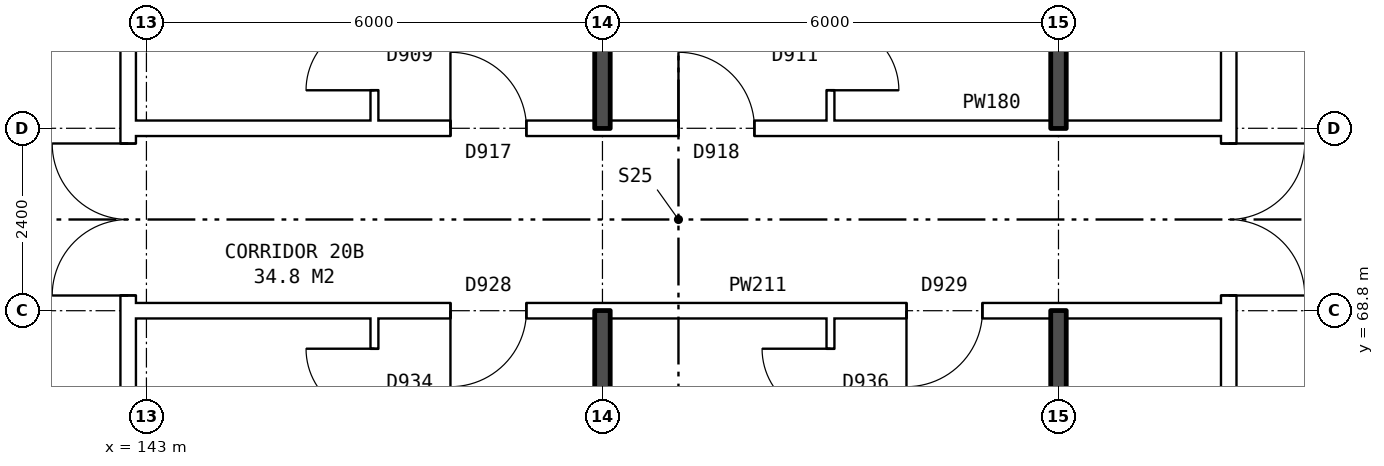
"""IFC4 building model, lengths in metres.
Left out: names, types, materials, properties, quantities, classifications, styles, units other than length and angle.
Written with IfcOpenShell. Run it as: python <this file> out.ifc"""

import sys

from ifc_helpers import new_model, si_unit, direction, frame, frame_2d, origin, place, context, subcontext, project, spatial, rectangle, extrude, element, fill, save


model = new_model("IFC4")
c1 = context("Model", 3, precision=1e-05, world=origin(), true_north=direction((0.0, 1.0)))
c2 = subcontext(c1, "Body", "Model", "MODEL_VIEW")
j1 = project(units=[si_unit("LENGTHUNIT", "METRE"), si_unit("PLANEANGLEUNIT", "RADIAN")], contexts=[c1])
p1 = place(None, origin())
s1 = spatial("IfcSite", under=j1, at=p1, CompositionType="ELEMENT")
p2 = place(p1, origin())
s2 = spatial("IfcBuilding", under=s1, at=p2, CompositionType="ELEMENT")
p3 = place(p2, frame((0.0, 0.0, 74.7)))
s3 = spatial("IfcBuildingStorey", under=s2, at=p3, CompositionType="ELEMENT", Elevation=74.7)
p4 = place(p3, frame((142.76, 63.9, 0.0), z_axis=(0.0, 0.0, 1.0), x_axis=(0.0, 1.0, 0.0)))
e1 = element("IfcWall", 1, at=p4, inside=s3, PredefinedType="PARTITIONING", context=c2, shape_type="SweptSolid", body=[
    extrude(rectangle(XDim=12.2, YDim=0.2, at=frame_2d((6.1, 0.0))), origin(), (0.0, 0.0, 1.0), 2.85),
])
p5 = place(p4, frame((5.1, 0.0, 0.0)))
e2 = element("IfcOpeningElement", 2, at=p5, cuts=e1, PredefinedType="OPENING", context=c2, shape_type="SweptSolid", body=[
    extrude(rectangle(XDim=2.0, YDim=2.1, at=frame_2d((1.0, 1.05))), frame((0.0, 0.11, 0.0), z_axis=(0.0, -1.0, 0.0), x_axis=(1.0, 0.0, 0.0)), (0.0, 0.0, 1.0), 0.22),
])
p6 = place(p3, frame((157.24, 63.9, 0.0), z_axis=(0.0, 0.0, 1.0), x_axis=(0.0, 1.0, 0.0)))
e3 = element("IfcWall", 3, at=p6, inside=s3, PredefinedType="PARTITIONING", context=c2, shape_type="SweptSolid", body=[
    extrude(rectangle(XDim=12.2, YDim=0.2, at=frame_2d((6.1, 0.0))), origin(), (0.0, 0.0, 1.0), 2.85),
])
p7 = place(p6, frame((5.1, 0.0, 0.0)))
e4 = element("IfcOpeningElement", 4, at=p7, cuts=e3, PredefinedType="OPENING", context=c2, shape_type="SweptSolid", body=[
    extrude(rectangle(XDim=2.0, YDim=2.1, at=frame_2d((1.0, 1.05))), frame((0.0, 0.11, 0.0), z_axis=(0.0, -1.0, 0.0), x_axis=(1.0, 0.0, 0.0)), (0.0, 0.0, 1.0), 0.22),
])
p8 = place(p3, frame((142.76, 68.8, 0.0), z_axis=(0.0, 0.0, 1.0), x_axis=(1.0, 0.0, 0.0)))
e5 = element("IfcWall", 5, at=p8, inside=s3, PredefinedType="PARTITIONING", context=c2, shape_type="SweptSolid", body=[
    extrude(rectangle(XDim=14.48, YDim=0.2, at=frame_2d((7.24, 0.0))), origin(), (0.0, 0.0, 1.0), 2.85),
])
p9 = place(p8, frame((4.24, 0.0, 0.0)))
e6 = element("IfcOpeningElement", 6, at=p9, cuts=e5, PredefinedType="OPENING", context=c2, shape_type="SweptSolid", body=[
    extrude(rectangle(XDim=1.0, YDim=2.1, at=frame_2d((0.5, 1.05))), frame((0.0, 0.11, 0.0), z_axis=(0.0, -1.0, 0.0), x_axis=(1.0, 0.0, 0.0)), (0.0, 0.0, 1.0), 0.22),
])
p10 = place(p8, frame((10.24, 0.0, 0.0)))
e7 = element("IfcOpeningElement", 7, at=p10, cuts=e5, PredefinedType="OPENING", context=c2, shape_type="SweptSolid", body=[
    extrude(rectangle(XDim=1.0, YDim=2.1, at=frame_2d((0.5, 1.05))), frame((0.0, 0.11, 0.0), z_axis=(0.0, -1.0, 0.0), x_axis=(1.0, 0.0, 0.0)), (0.0, 0.0, 1.0), 0.22),
])
p11 = place(p3, frame((142.76, 71.2, 0.0), z_axis=(0.0, 0.0, 1.0), x_axis=(1.0, 0.0, 0.0)))
e8 = element("IfcWall", 8, at=p11, inside=s3, PredefinedType="PARTITIONING", context=c2, shape_type="SweptSolid", body=[
    extrude(rectangle(XDim=14.48, YDim=0.2, at=frame_2d((7.24, 0.0))), origin(), (0.0, 0.0, 1.0), 2.85),
])
p12 = place(p11, frame((4.24, 0.0, 0.0)))
e9 = element("IfcOpeningElement", 9, at=p12, cuts=e8, PredefinedType="OPENING", context=c2, shape_type="SweptSolid", body=[
    extrude(rectangle(XDim=1.0, YDim=2.1, at=frame_2d((0.5, 1.05))), frame((0.0, 0.11, 0.0), z_axis=(0.0, -1.0, 0.0), x_axis=(1.0, 0.0, 0.0)), (0.0, 0.0, 1.0), 0.22),
])
p13 = place(p11, frame((7.24, 0.0, 0.0)))
e10 = element("IfcOpeningElement", 10, at=p13, cuts=e8, PredefinedType="OPENING", context=c2, shape_type="SweptSolid", body=[
    extrude(rectangle(XDim=1.0, YDim=2.1, at=frame_2d((0.5, 1.05))), frame((0.0, 0.11, 0.0), z_axis=(0.0, -1.0, 0.0), x_axis=(1.0, 0.0, 0.0)), (0.0, 0.0, 1.0), 0.22),
])
p14 = place(p3, frame((146.0, 54.36, 0.0), z_axis=(0.0, 0.0, 1.0), x_axis=(0.0, 1.0, 0.0)))
e11 = element("IfcWall", 11, at=p14, inside=s3, PredefinedType="PARTITIONING", context=c2, shape_type="SweptSolid", body=[
    extrude(rectangle(XDim=14.34, YDim=0.1, at=frame_2d((7.17, 0.0))), origin(), (0.0, 0.0, 1.0), 2.85),
])
p15 = place(p14, frame((4.2, 0.0, 0.0)))
e12 = element("IfcOpeningElement", 12, at=p15, cuts=e11, PredefinedType="OPENING", context=c2, shape_type="SweptSolid", body=[
    extrude(rectangle(XDim=0.9, YDim=2.1, at=frame_2d((0.45, 1.05))), frame((0.0, 0.06, 0.0), z_axis=(0.0, -1.0, 0.0), x_axis=(1.0, 0.0, 0.0)), (0.0, 0.0, 1.0), 0.12),
])
p16 = place(p14, frame((13.04, 0.0, 0.0)))
e13 = element("IfcOpeningElement", 13, at=p16, cuts=e11, PredefinedType="OPENING", context=c2, shape_type="SweptSolid", body=[
    extrude(rectangle(XDim=0.9, YDim=2.1, at=frame_2d((0.45, 1.05))), frame((0.0, 0.06, 0.0), z_axis=(0.0, -1.0, 0.0), x_axis=(1.0, 0.0, 0.0)), (0.0, 0.0, 1.0), 0.12),
])
p17 = place(p3, frame((146.0, 71.3, 0.0), z_axis=(0.0, 0.0, 1.0), x_axis=(0.0, 1.0, 0.0)))
e14 = element("IfcWall", 14, at=p17, inside=s3, PredefinedType="PARTITIONING", context=c2, shape_type="SweptSolid", body=[
    extrude(rectangle(XDim=14.34, YDim=0.1, at=frame_2d((7.17, 0.0))), origin(), (0.0, 0.0, 1.0), 2.85),
])
p18 = place(p17, frame((9.24, 0.0, 0.0)))
e15 = element("IfcOpeningElement", 15, at=p18, cuts=e14, PredefinedType="OPENING", context=c2, shape_type="SweptSolid", body=[
    extrude(rectangle(XDim=0.9, YDim=2.1, at=frame_2d((0.45, 1.05))), frame((0.0, 0.06, 0.0), z_axis=(0.0, -1.0, 0.0), x_axis=(1.0, 0.0, 0.0)), (0.0, 0.0, 1.0), 0.12),
])
p19 = place(p17, frame((0.4, 0.0, 0.0)))
e16 = element("IfcOpeningElement", 16, at=p19, cuts=e14, PredefinedType="OPENING", context=c2, shape_type="SweptSolid", body=[
    extrude(rectangle(XDim=0.9, YDim=2.1, at=frame_2d((0.45, 1.05))), frame((0.0, 0.06, 0.0), z_axis=(0.0, -1.0, 0.0), x_axis=(1.0, 0.0, 0.0)), (0.0, 0.0, 1.0), 0.12),
])
for number, where, z_axis, x_axis in (
    (17, (149.0, 54.36, 0.0), (0.0, 0.0, 1.0), (0.0, 1.0, 0.0)),
    (18, (149.0, 71.2, 0.0), (0.0, 0.0, 1.0), (0.0, 1.0, 0.0)),
):
    element("IfcWall", number, at=place(p3, frame(where, z_axis=z_axis, x_axis=x_axis)), inside=s3, PredefinedType="SOLIDWALL", context=c2, shape_type="SweptSolid", body=[
        extrude(rectangle(XDim=14.44, YDim=0.2, at=frame_2d((7.22, 0.0))), origin(), (0.0, 0.0, 1.0), 2.85),
    ])
p20 = place(p3, frame((152.0, 54.36, 0.0), z_axis=(0.0, 0.0, 1.0), x_axis=(0.0, 1.0, 0.0)))
e19 = element("IfcWall", 19, at=p20, inside=s3, PredefinedType="PARTITIONING", context=c2, shape_type="SweptSolid", body=[
    extrude(rectangle(XDim=14.34, YDim=0.1, at=frame_2d((7.17, 0.0))), origin(), (0.0, 0.0, 1.0), 2.85),
])
p21 = place(p20, frame((4.2, 0.0, 0.0)))
e20 = element("IfcOpeningElement", 20, at=p21, cuts=e19, PredefinedType="OPENING", context=c2, shape_type="SweptSolid", body=[
    extrude(rectangle(XDim=0.9, YDim=2.1, at=frame_2d((0.45, 1.05))), frame((0.0, 0.06, 0.0), z_axis=(0.0, -1.0, 0.0), x_axis=(1.0, 0.0, 0.0)), (0.0, 0.0, 1.0), 0.12),
])
p22 = place(p20, frame((13.04, 0.0, 0.0)))
e21 = element("IfcOpeningElement", 21, at=p22, cuts=e19, PredefinedType="OPENING", context=c2, shape_type="SweptSolid", body=[
    extrude(rectangle(XDim=0.9, YDim=2.1, at=frame_2d((0.45, 1.05))), frame((0.0, 0.06, 0.0), z_axis=(0.0, -1.0, 0.0), x_axis=(1.0, 0.0, 0.0)), (0.0, 0.0, 1.0), 0.12),
])
p23 = place(p3, frame((152.0, 71.3, 0.0), z_axis=(0.0, 0.0, 1.0), x_axis=(0.0, 1.0, 0.0)))
e22 = element("IfcWall", 22, at=p23, inside=s3, PredefinedType="PARTITIONING", context=c2, shape_type="SweptSolid", body=[
    extrude(rectangle(XDim=14.34, YDim=0.1, at=frame_2d((7.17, 0.0))), origin(), (0.0, 0.0, 1.0), 2.85),
])
p24 = place(p23, frame((7.94, 0.0, 0.0)))
e23 = element("IfcOpeningElement", 23, at=p24, cuts=e22, PredefinedType="OPENING", context=c2, shape_type="SweptSolid", body=[
    extrude(rectangle(XDim=0.9, YDim=2.1, at=frame_2d((0.45, 1.05))), frame((0.0, 0.06, 0.0), z_axis=(0.0, -1.0, 0.0), x_axis=(1.0, 0.0, 0.0)), (0.0, 0.0, 1.0), 0.12),
])
p25 = place(p23, frame((0.4, 0.0, 0.0)))
e24 = element("IfcOpeningElement", 24, at=p25, cuts=e22, PredefinedType="OPENING", context=c2, shape_type="SweptSolid", body=[
    extrude(rectangle(XDim=0.9, YDim=2.1, at=frame_2d((0.45, 1.05))), frame((0.0, 0.06, 0.0), z_axis=(0.0, -1.0, 0.0), x_axis=(1.0, 0.0, 0.0)), (0.0, 0.0, 1.0), 0.12),
])
for number, where, z_axis, x_axis in (
    (25, (155.0, 63.8, 0.0), (0.0, 0.0, 1.0), (0.0, 1.0, 0.0)),
    (26, (155.0, 71.2, 0.0), (0.0, 0.0, 1.0), (0.0, 1.0, 0.0)),
):
    element("IfcWall", number, at=place(p3, frame(where, z_axis=z_axis, x_axis=x_axis)), inside=s3, PredefinedType="SOLIDWALL", context=c2, shape_type="SweptSolid", body=[
        extrude(rectangle(XDim=5.0, YDim=0.2, at=frame_2d((2.5, 0.0))), origin(), (0.0, 0.0, 1.0), 2.85),
    ])
p26 = place(p5, origin())
e27 = element("IfcDoor", 27, at=p26, inside=s3, OperationType="DOUBLE_DOOR_SINGLE_SWING", PredefinedType="DOOR", context=c2, shape_type="SweptSolid", body=[
    extrude(rectangle(XDim=2.0, YDim=2.1, at=frame_2d((1.0, 1.05))), frame((0.0, 0.025, 0.0), z_axis=(0.0, -1.0, 0.0), x_axis=(1.0, 0.0, 0.0)), (0.0, 0.0, 1.0), 0.05),
])
fill(e2, e27)
p27 = place(p7, frame((2.0, 0.0, 0.0), z_axis=(0.0, 0.0, 1.0), x_axis=(-1.0, 0.0, 0.0)))
e28 = element("IfcDoor", 28, at=p27, inside=s3, OperationType="DOUBLE_DOOR_SINGLE_SWING", PredefinedType="DOOR", context=c2, shape_type="SweptSolid", body=[
    extrude(rectangle(XDim=2.0, YDim=2.1, at=frame_2d((1.0, 1.05))), frame((0.0, 0.025, 0.0), z_axis=(0.0, -1.0, 0.0), x_axis=(1.0, 0.0, 0.0)), (0.0, 0.0, 1.0), 0.05),
])
fill(e4, e28)
p28 = place(p9, frame((1.0, 0.0, 0.0), z_axis=(0.0, 0.0, 1.0), x_axis=(-1.0, 0.0, 0.0)))
e29 = element("IfcDoor", 29, at=p28, inside=s3, OperationType="SINGLE_SWING_RIGHT", PredefinedType="DOOR", context=c2, shape_type="SweptSolid", body=[
    extrude(rectangle(XDim=1.0, YDim=2.1, at=frame_2d((0.5, 1.05))), frame((0.0, 0.025, 0.0), z_axis=(0.0, -1.0, 0.0), x_axis=(1.0, 0.0, 0.0)), (0.0, 0.0, 1.0), 0.05),
])
fill(e6, e29)
p29 = place(p16, origin())
e30 = element("IfcDoor", 30, at=p29, inside=s3, OperationType="SINGLE_SWING_RIGHT", PredefinedType="DOOR", context=c2, shape_type="SweptSolid", body=[
    extrude(rectangle(XDim=0.9, YDim=2.1, at=frame_2d((0.45, 1.05))), frame((0.0, 0.025, 0.0), z_axis=(0.0, -1.0, 0.0), x_axis=(1.0, 0.0, 0.0)), (0.0, 0.0, 1.0), 0.05),
])
fill(e13, e30)
p30 = place(p10, frame((1.0, 0.0, 0.0), z_axis=(0.0, 0.0, 1.0), x_axis=(-1.0, 0.0, 0.0)))
e31 = element("IfcDoor", 31, at=p30, inside=s3, OperationType="SINGLE_SWING_RIGHT", PredefinedType="DOOR", context=c2, shape_type="SweptSolid", body=[
    extrude(rectangle(XDim=1.0, YDim=2.1, at=frame_2d((0.5, 1.05))), frame((0.0, 0.025, 0.0), z_axis=(0.0, -1.0, 0.0), x_axis=(1.0, 0.0, 0.0)), (0.0, 0.0, 1.0), 0.05),
])
fill(e7, e31)
p31 = place(p22, origin())
e32 = element("IfcDoor", 32, at=p31, inside=s3, OperationType="SINGLE_SWING_RIGHT", PredefinedType="DOOR", context=c2, shape_type="SweptSolid", body=[
    extrude(rectangle(XDim=0.9, YDim=2.1, at=frame_2d((0.45, 1.05))), frame((0.0, 0.025, 0.0), z_axis=(0.0, -1.0, 0.0), x_axis=(1.0, 0.0, 0.0)), (0.0, 0.0, 1.0), 0.05),
])
fill(e21, e32)
p32 = place(p12, origin())
e33 = element("IfcDoor", 33, at=p32, inside=s3, OperationType="SINGLE_SWING_LEFT", PredefinedType="DOOR", context=c2, shape_type="SweptSolid", body=[
    extrude(rectangle(XDim=1.0, YDim=2.1, at=frame_2d((0.5, 1.05))), frame((0.0, 0.025, 0.0), z_axis=(0.0, -1.0, 0.0), x_axis=(1.0, 0.0, 0.0)), (0.0, 0.0, 1.0), 0.05),
])
fill(e9, e33)
p33 = place(p19, origin())
e34 = element("IfcDoor", 34, at=p33, inside=s3, OperationType="SINGLE_SWING_LEFT", PredefinedType="DOOR", context=c2, shape_type="SweptSolid", body=[
    extrude(rectangle(XDim=0.9, YDim=2.1, at=frame_2d((0.45, 1.05))), frame((0.0, 0.025, 0.0), z_axis=(0.0, -1.0, 0.0), x_axis=(1.0, 0.0, 0.0)), (0.0, 0.0, 1.0), 0.05),
])
fill(e16, e34)
p34 = place(p13, origin())
e35 = element("IfcDoor", 35, at=p34, inside=s3, OperationType="SINGLE_SWING_LEFT", PredefinedType="DOOR", context=c2, shape_type="SweptSolid", body=[
    extrude(rectangle(XDim=1.0, YDim=2.1, at=frame_2d((0.5, 1.05))), frame((0.0, 0.025, 0.0), z_axis=(0.0, -1.0, 0.0), x_axis=(1.0, 0.0, 0.0)), (0.0, 0.0, 1.0), 0.05),
])
fill(e10, e35)
p35 = place(p25, frame((0.9, 0.0, 0.0), z_axis=(0.0, 0.0, 1.0), x_axis=(-1.0, 0.0, 0.0)))
e36 = element("IfcDoor", 36, at=p35, inside=s3, OperationType="SINGLE_SWING_RIGHT", PredefinedType="DOOR", context=c2, shape_type="SweptSolid", body=[
    extrude(rectangle(XDim=0.9, YDim=2.1, at=frame_2d((0.45, 1.05))), frame((0.0, 0.025, 0.0), z_axis=(0.0, -1.0, 0.0), x_axis=(1.0, 0.0, 0.0)), (0.0, 0.0, 1.0), 0.05),
])
fill(e24, e36)
save(model, sys.argv[1])
